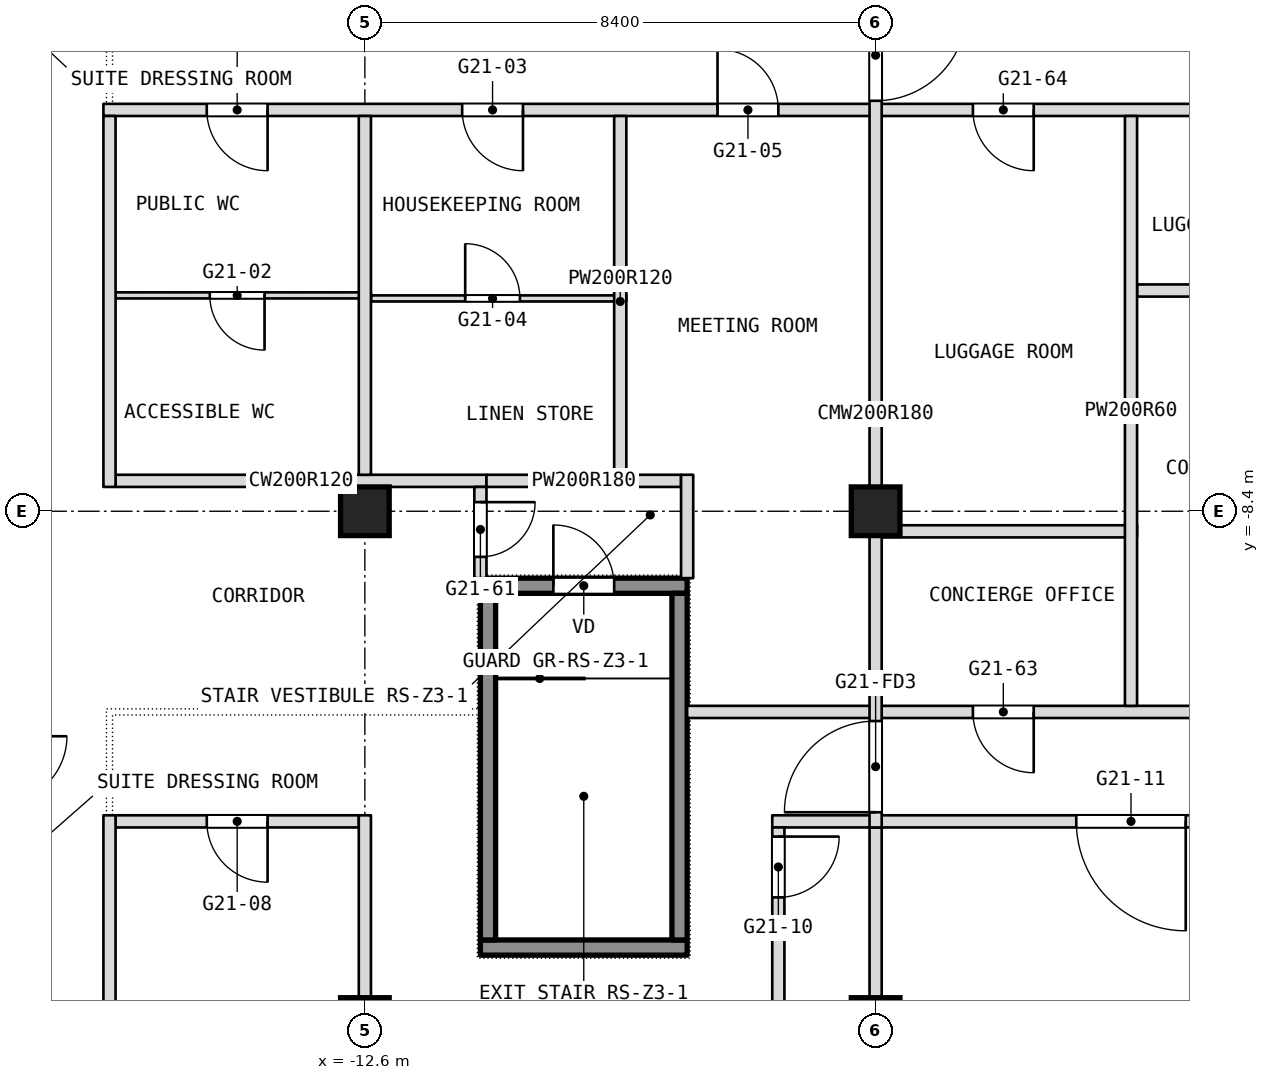
"""IFC4 building model, lengths in metres.
Left out: names, types, materials, properties, quantities, classifications, styles, units other than length and angle.
Written with IfcOpenShell. Run it as: python <this file> out.ifc"""

import sys

from ifc_helpers import new_model, si_unit, direction, frame, frame_2d, origin, origin_2d, place, context, subcontext, project, spatial, rectangle, extrude, element, fill, save


model = new_model("IFC4")
c1 = context("Model", 3, precision=1e-05, world=origin(), true_north=direction((0.0, 1.0)))
c2 = subcontext(c1, "Body", "Model", "MODEL_VIEW")
j1 = project(units=[si_unit("LENGTHUNIT", "METRE"), si_unit("PLANEANGLEUNIT", "RADIAN")], contexts=[c1])
p1 = place(None, origin())
s1 = spatial("IfcSite", under=j1, at=p1, CompositionType="ELEMENT")
p2 = place(p1, origin())
s2 = spatial("IfcBuilding", under=s1, at=p2, CompositionType="ELEMENT")
p3 = place(p2, frame((0.0, 0.0, 248.9)))
s3 = spatial("IfcBuildingStorey", under=s2, at=p3, CompositionType="ELEMENT", Elevation=248.9)
for number, where, z_axis, x_axis in (
    (1, (-12.6, -16.8, 0.0), (0.0, 0.0, 1.0), (1.0, 0.0, 0.0)),
    (2, (-12.6, -8.4, 0.0), (0.0, 0.0, 1.0), (1.0, 0.0, 0.0)),
    (3, (-4.2, -16.8, 0.0), (0.0, 0.0, 1.0), (1.0, 0.0, 0.0)),
    (4, (-4.2, -8.4, 0.0), (0.0, 0.0, 1.0), (1.0, 0.0, 0.0)),
):
    element("IfcColumn", number, at=place(p3, frame(where, z_axis=z_axis, x_axis=x_axis)), inside=s3, PredefinedType="COLUMN", context=c2, shape_type="SweptSolid", body=[
        extrude(rectangle(XDim=0.8, YDim=0.8, at=origin_2d()), origin(), (0.0, 0.0, 1.0), 3.6),
    ])
p4 = place(p3, frame((-16.7, -13.5, 0.0), z_axis=(0.0, 0.0, 1.0), x_axis=(1.0, 0.0, 0.0)))
e5 = element("IfcWall", 5, at=p4, inside=s3, PredefinedType="PARTITIONING", context=c2, shape_type="SweptSolid", body=[
    extrude(rectangle(XDim=4.0, YDim=0.2, at=frame_2d((2.0, 0.0))), origin(), (0.0, 0.0, 1.0), 3.3),
])
p5 = place(p4, frame((1.5, 0.0, 0.0)))
e6 = element("IfcOpeningElement", 6, at=p5, cuts=e5, PredefinedType="OPENING", context=c2, shape_type="SweptSolid", body=[
    extrude(rectangle(XDim=1.0, YDim=2.1, at=frame_2d((0.5, 1.05))), frame((0.0, 0.1, 0.0), z_axis=(0.0, -1.0, 0.0), x_axis=(1.0, 0.0, 0.0)), (0.0, 0.0, 1.0), 0.2),
])
p6 = place(p3, frame((-5.9, -13.5, 0.0), z_axis=(0.0, 0.0, 1.0), x_axis=(1.0, 0.0, 0.0)))
e7 = element("IfcWall", 7, at=p6, inside=s3, PredefinedType="PARTITIONING", context=c2, shape_type="SweptSolid", body=[
    extrude(rectangle(XDim=11.6, YDim=0.2, at=frame_2d((5.8, 0.0))), origin(), (0.0, 0.0, 1.0), 3.3),
])
p7 = place(p6, frame((5.0, 0.0, 0.0)))
e8 = element("IfcOpeningElement", 8, at=p7, cuts=e7, PredefinedType="OPENING", context=c2, shape_type="SweptSolid", body=[
    extrude(rectangle(XDim=1.8, YDim=2.1, at=frame_2d((0.9, 1.05))), frame((0.0, 0.1, 0.0), z_axis=(0.0, -1.0, 0.0), x_axis=(1.0, 0.0, 0.0)), (0.0, 0.0, 1.0), 0.2),
])
p8 = place(p3, frame((-7.3, -11.7, 0.0), z_axis=(0.0, 0.0, 1.0), x_axis=(1.0, 0.0, 0.0)))
e9 = element("IfcWall", 9, at=p8, inside=s3, PredefinedType="PARTITIONING", context=c2, shape_type="SweptSolid", body=[
    extrude(rectangle(XDim=14.6, YDim=0.2, at=frame_2d((7.3, 0.0))), origin(), (0.0, 0.0, 1.0), 3.3),
])
p9 = place(p8, frame((4.7, 0.0, 0.0)))
e10 = element("IfcOpeningElement", 10, at=p9, cuts=e9, PredefinedType="OPENING", context=c2, shape_type="SweptSolid", body=[
    extrude(rectangle(XDim=1.0, YDim=2.1, at=frame_2d((0.5, 1.05))), frame((0.0, 0.1, 0.0), z_axis=(0.0, -1.0, 0.0), x_axis=(1.0, 0.0, 0.0)), (0.0, 0.0, 1.0), 0.2),
])
p10 = place(p8, frame((8.9, 0.0, 0.0)))
e11 = element("IfcOpeningElement", 11, at=p10, cuts=e9, PredefinedType="OPENING", context=c2, shape_type="SweptSolid", body=[
    extrude(rectangle(XDim=1.0, YDim=2.1, at=frame_2d((0.5, 1.05))), frame((0.0, 0.1, 0.0), z_axis=(0.0, -1.0, 0.0), x_axis=(1.0, 0.0, 0.0)), (0.0, 0.0, 1.0), 0.2),
])
p11 = place(p3, frame((-4.1, -8.73, 0.0), z_axis=(0.0, 0.0, 1.0), x_axis=(1.0, 0.0, 0.0)))
e12 = element("IfcWall", 12, at=p11, inside=s3, PredefinedType="PARTITIONING", context=c2, shape_type="SweptSolid", body=[
    extrude(rectangle(XDim=4.2, YDim=0.2, at=frame_2d((2.1, 0.0))), origin(), (0.0, 0.0, 1.0), 3.3),
])
p12 = place(p3, frame((-16.7, -7.9, 0.0), z_axis=(0.0, 0.0, 1.0), x_axis=(1.0, 0.0, 0.0)))
e13 = element("IfcWall", 13, at=p12, inside=s3, PredefinedType="PARTITIONING", context=c2, shape_type="SweptSolid", body=[
    extrude(rectangle(XDim=6.1, YDim=0.2, at=frame_2d((3.05, 0.0))), origin(), (0.0, 0.0, 1.0), 3.3),
])
p13 = place(p3, frame((-10.6, -7.9, 0.0), z_axis=(0.0, 0.0, 1.0), x_axis=(1.0, 0.0, 0.0)))
e14 = element("IfcWall", 14, at=p13, inside=s3, PredefinedType="PARTITIONING", context=c2, shape_type="SweptSolid", body=[
    extrude(rectangle(XDim=3.2, YDim=0.2, at=frame_2d((1.6, 0.0))), origin(), (0.0, 0.0, 1.0), 3.3),
])
p14 = place(p3, frame((-12.5, -4.9, 0.0), z_axis=(0.0, 0.0, 1.0), x_axis=(1.0, 0.0, 0.0)))
e15 = element("IfcWall", 15, at=p14, inside=s3, PredefinedType="PARTITIONING", context=c2, shape_type="SweptSolid", body=[
    extrude(rectangle(XDim=4.2, YDim=0.1, at=frame_2d((2.1, 0.0))), origin(), (0.0, 0.0, 1.0), 3.3),
])
p15 = place(p14, frame((1.55, 0.0, 0.0)))
e16 = element("IfcOpeningElement", 16, at=p15, cuts=e15, PredefinedType="OPENING", context=c2, shape_type="SweptSolid", body=[
    extrude(rectangle(XDim=0.9, YDim=2.1, at=frame_2d((0.45, 1.05))), frame((0.0, 0.05, 0.0), z_axis=(0.0, -1.0, 0.0), x_axis=(1.0, 0.0, 0.0)), (0.0, 0.0, 1.0), 0.1),
])
p16 = place(p3, frame((-16.7, -4.85, 0.0), z_axis=(0.0, 0.0, 1.0), x_axis=(1.0, 0.0, 0.0)))
e17 = element("IfcWall", 17, at=p16, inside=s3, PredefinedType="PARTITIONING", context=c2, shape_type="SweptSolid", body=[
    extrude(rectangle(XDim=4.2, YDim=0.1, at=frame_2d((2.1, 0.0))), origin(), (0.0, 0.0, 1.0), 3.3),
])
p17 = place(p16, frame((1.55, 0.0, 0.0)))
e18 = element("IfcOpeningElement", 18, at=p17, cuts=e17, PredefinedType="OPENING", context=c2, shape_type="SweptSolid", body=[
    extrude(rectangle(XDim=0.9, YDim=2.1, at=frame_2d((0.45, 1.05))), frame((0.0, 0.05, 0.0), z_axis=(0.0, -1.0, 0.0), x_axis=(1.0, 0.0, 0.0)), (0.0, 0.0, 1.0), 0.1),
])
p18 = place(p3, frame((0.1, -4.77, 0.0), z_axis=(0.0, 0.0, 1.0), x_axis=(1.0, 0.0, 0.0)))
e19 = element("IfcWall", 19, at=p18, inside=s3, PredefinedType="PARTITIONING", context=c2, shape_type="SweptSolid", body=[
    extrude(rectangle(XDim=4.0, YDim=0.2, at=frame_2d((2.0, 0.0))), origin(), (0.0, 0.0, 1.0), 3.3),
])
p19 = place(p3, frame((-16.9, -1.8, 0.0), z_axis=(0.0, 0.0, 1.0), x_axis=(1.0, 0.0, 0.0)))
e20 = element("IfcWall", 20, at=p19, inside=s3, PredefinedType="PARTITIONING", context=c2, shape_type="SweptSolid", body=[
    extrude(rectangle(XDim=33.8, YDim=0.2, at=frame_2d((16.9, 0.0))), origin(), (0.0, 0.0, 1.0), 3.3),
])
p20 = place(p19, frame((1.7, 0.0, 0.0)))
e21 = element("IfcOpeningElement", 21, at=p20, cuts=e20, PredefinedType="OPENING", context=c2, shape_type="SweptSolid", body=[
    extrude(rectangle(XDim=1.0, YDim=2.1, at=frame_2d((0.5, 1.05))), frame((0.0, 0.1, 0.0), z_axis=(0.0, -1.0, 0.0), x_axis=(1.0, 0.0, 0.0)), (0.0, 0.0, 1.0), 0.2),
])
p21 = place(p19, frame((5.9, 0.0, 0.0)))
e22 = element("IfcOpeningElement", 22, at=p21, cuts=e20, PredefinedType="OPENING", context=c2, shape_type="SweptSolid", body=[
    extrude(rectangle(XDim=1.0, YDim=2.1, at=frame_2d((0.5, 1.05))), frame((0.0, 0.1, 0.0), z_axis=(0.0, -1.0, 0.0), x_axis=(1.0, 0.0, 0.0)), (0.0, 0.0, 1.0), 0.2),
])
p22 = place(p19, frame((10.1, 0.0, 0.0)))
e23 = element("IfcOpeningElement", 23, at=p22, cuts=e20, PredefinedType="OPENING", context=c2, shape_type="SweptSolid", body=[
    extrude(rectangle(XDim=1.0, YDim=2.1, at=frame_2d((0.5, 1.05))), frame((0.0, 0.1, 0.0), z_axis=(0.0, -1.0, 0.0), x_axis=(1.0, 0.0, 0.0)), (0.0, 0.0, 1.0), 0.2),
])
p23 = place(p19, frame((24.4, 0.0, 0.0)))
e24 = element("IfcOpeningElement", 24, at=p23, cuts=e20, PredefinedType="OPENING", context=c2, shape_type="SweptSolid", body=[
    extrude(rectangle(XDim=1.8, YDim=2.1, at=frame_2d((0.9, 1.05))), frame((0.0, 0.1, 0.0), z_axis=(0.0, -1.0, 0.0), x_axis=(1.0, 0.0, 0.0)), (0.0, 0.0, 1.0), 0.2),
])
p24 = place(p19, frame((31.1, 0.0, 0.0)))
e25 = element("IfcOpeningElement", 25, at=p24, cuts=e20, PredefinedType="OPENING", context=c2, shape_type="SweptSolid", body=[
    extrude(rectangle(XDim=1.0, YDim=2.1, at=frame_2d((0.5, 1.05))), frame((0.0, 0.1, 0.0), z_axis=(0.0, -1.0, 0.0), x_axis=(1.0, 0.0, 0.0)), (0.0, 0.0, 1.0), 0.2),
])
p25 = place(p19, frame((14.3, 0.0, 0.0)))
e26 = element("IfcOpeningElement", 26, at=p25, cuts=e20, PredefinedType="OPENING", context=c2, shape_type="SweptSolid", body=[
    extrude(rectangle(XDim=1.0, YDim=2.1, at=frame_2d((0.5, 1.05))), frame((0.0, 0.1, 0.0), z_axis=(0.0, -1.0, 0.0), x_axis=(1.0, 0.0, 0.0)), (0.0, 0.0, 1.0), 0.2),
])
p26 = place(p19, frame((18.5, 0.0, 0.0)))
e27 = element("IfcOpeningElement", 27, at=p26, cuts=e20, PredefinedType="OPENING", context=c2, shape_type="SweptSolid", body=[
    extrude(rectangle(XDim=1.0, YDim=2.1, at=frame_2d((0.5, 1.05))), frame((0.0, 0.1, 0.0), z_axis=(0.0, -1.0, 0.0), x_axis=(1.0, 0.0, 0.0)), (0.0, 0.0, 1.0), 0.2),
])
p27 = place(p3, frame((0.0, -11.6, 0.0), z_axis=(0.0, 0.0, 1.0), x_axis=(0.0, 1.0, 0.0)))
e28 = element("IfcWall", 28, at=p27, inside=s3, PredefinedType="PARTITIONING", context=c2, shape_type="SweptSolid", body=[
    extrude(rectangle(XDim=9.7, YDim=0.2, at=frame_2d((4.85, 0.0))), origin(), (0.0, 0.0, 1.0), 3.3),
])
p28 = place(p3, frame((-4.2, -22.0, 0.0), z_axis=(0.0, 0.0, 1.0), x_axis=(0.0, 1.0, 0.0)))
e29 = element("IfcWall", 29, at=p28, inside=s3, PredefinedType="PARTITIONING", context=c2, shape_type="SweptSolid", body=[
    extrude(rectangle(XDim=8.4, YDim=0.2, at=frame_2d((4.2, 0.0))), origin(), (0.0, 0.0, 1.0), 2.486),
])
p29 = place(p28, frame((0.25, 0.0, 0.0)))
e30 = element("IfcOpeningElement", 30, at=p29, cuts=e29, PredefinedType="OPENING", context=c2, shape_type="SweptSolid", body=[
    extrude(rectangle(XDim=1.5, YDim=2.1, at=frame_2d((0.75, 1.05))), frame((0.0, 0.1, 0.0), z_axis=(0.0, -1.0, 0.0), x_axis=(1.0, 0.0, 0.0)), (0.0, 0.0, 1.0), 0.2),
])
p30 = place(p3, frame((-4.2, -13.6, 0.0), z_axis=(0.0, 0.0, 1.0), x_axis=(0.0, 1.0, 0.0)))
e31 = element("IfcWall", 31, at=p30, inside=s3, PredefinedType="PARTITIONING", context=c2, shape_type="SweptSolid", body=[
    extrude(rectangle(XDim=13.6, YDim=0.2, at=frame_2d((6.8, 0.0))), origin(), (0.0, 0.0, 1.0), 2.486),
])
p31 = place(p30, frame((11.95, 0.0, 0.0)))
e32 = element("IfcOpeningElement", 32, at=p31, cuts=e31, PredefinedType="OPENING", context=c2, shape_type="SweptSolid", body=[
    extrude(rectangle(XDim=1.5, YDim=2.1, at=frame_2d((0.75, 1.05))), frame((0.0, 0.1, 0.0), z_axis=(0.0, -1.0, 0.0), x_axis=(1.0, 0.0, 0.0)), (0.0, 0.0, 1.0), 0.2),
])
p32 = place(p30, frame((0.25, 0.0, 0.0)))
e33 = element("IfcOpeningElement", 33, at=p32, cuts=e31, PredefinedType="OPENING", context=c2, shape_type="SweptSolid", body=[
    extrude(rectangle(XDim=1.5, YDim=2.1, at=frame_2d((0.75, 1.05))), frame((0.0, 0.1, 0.0), z_axis=(0.0, -1.0, 0.0), x_axis=(1.0, 0.0, 0.0)), (0.0, 0.0, 1.0), 0.2),
])
p33 = place(p3, frame((-5.8, -18.5, 0.0), z_axis=(0.0, 0.0, 1.0), x_axis=(0.0, 1.0, 0.0)))
e34 = element("IfcWall", 34, at=p33, inside=s3, PredefinedType="PARTITIONING", context=c2, shape_type="SweptSolid", body=[
    extrude(rectangle(XDim=4.9, YDim=0.2, at=frame_2d((2.45, 0.0))), origin(), (0.0, 0.0, 1.0), 3.3),
])
p34 = place(p33, frame((3.75, 0.0, 0.0)))
e35 = element("IfcOpeningElement", 35, at=p34, cuts=e34, PredefinedType="OPENING", context=c2, shape_type="SweptSolid", body=[
    extrude(rectangle(XDim=1.0, YDim=2.1, at=frame_2d((0.5, 1.05))), frame((0.0, 0.1, 0.0), z_axis=(0.0, -1.0, 0.0), x_axis=(1.0, 0.0, 0.0)), (0.0, 0.0, 1.0), 0.2),
])
p35 = place(p3, frame((-7.3, -9.5, 0.0), z_axis=(0.0, 0.0, 1.0), x_axis=(0.0, 1.0, 0.0)))
e36 = element("IfcWall", 36, at=p35, inside=s3, PredefinedType="PARTITIONING", context=c2, shape_type="SweptSolid", body=[
    extrude(rectangle(XDim=1.7, YDim=0.2, at=frame_2d((0.85, 0.0))), origin(), (0.0, 0.0, 1.0), 3.3),
])
p36 = place(p3, frame((-8.4, -8.0, 0.0), z_axis=(0.0, 0.0, 1.0), x_axis=(0.0, 1.0, 0.0)))
e37 = element("IfcWall", 37, at=p36, inside=s3, PredefinedType="PARTITIONING", context=c2, shape_type="SweptSolid", body=[
    extrude(rectangle(XDim=6.1, YDim=0.2, at=frame_2d((3.05, 0.0))), origin(), (0.0, 0.0, 1.0), 3.3),
])
p37 = place(p3, frame((-10.7, -9.5, 0.0), z_axis=(0.0, 0.0, 1.0), x_axis=(0.0, 1.0, 0.0)))
e38 = element("IfcWall", 38, at=p37, inside=s3, PredefinedType="PARTITIONING", context=c2, shape_type="SweptSolid", body=[
    extrude(rectangle(XDim=1.5, YDim=0.2, at=frame_2d((0.75, 0.0))), origin(), (0.0, 0.0, 1.0), 3.3),
])
p38 = place(p37, frame((0.35, 0.0, 0.0)))
e39 = element("IfcOpeningElement", 39, at=p38, cuts=e38, PredefinedType="OPENING", context=c2, shape_type="SweptSolid", body=[
    extrude(rectangle(XDim=0.9, YDim=2.1, at=frame_2d((0.45, 1.05))), frame((0.0, 0.1, 0.0), z_axis=(0.0, -1.0, 0.0), x_axis=(1.0, 0.0, 0.0)), (0.0, 0.0, 1.0), 0.2),
])
p39 = place(p3, frame((-12.6, -7.8, 0.0), z_axis=(0.0, 0.0, 1.0), x_axis=(0.0, 1.0, 0.0)))
e40 = element("IfcWall", 40, at=p39, inside=s3, PredefinedType="PARTITIONING", context=c2, shape_type="SweptSolid", body=[
    extrude(rectangle(XDim=5.9, YDim=0.2, at=frame_2d((2.95, 0.0))), origin(), (0.0, 0.0, 1.0), 2.486),
])
p40 = place(p3, frame((-12.6, -18.5, 0.0), z_axis=(0.0, 0.0, 1.0), x_axis=(0.0, 1.0, 0.0)))
e41 = element("IfcWall", 41, at=p40, inside=s3, PredefinedType="PARTITIONING", context=c2, shape_type="SweptSolid", body=[
    extrude(rectangle(XDim=5.1, YDim=0.2, at=frame_2d((2.55, 0.0))), origin(), (0.0, 0.0, 1.0), 2.486),
])
p41 = place(p3, frame((-16.8, -20.2, 0.0), z_axis=(0.0, 0.0, 1.0), x_axis=(0.0, 1.0, 0.0)))
e42 = element("IfcWall", 42, at=p41, inside=s3, PredefinedType="PARTITIONING", context=c2, shape_type="SweptSolid", body=[
    extrude(rectangle(XDim=6.8, YDim=0.2, at=frame_2d((3.4, 0.0))), origin(), (0.0, 0.0, 1.0), 3.3),
])
p42 = place(p3, frame((-16.8, -8.0, 0.0), z_axis=(0.0, 0.0, 1.0), x_axis=(0.0, 1.0, 0.0)))
e43 = element("IfcWall", 43, at=p42, inside=s3, PredefinedType="PARTITIONING", context=c2, shape_type="SweptSolid", body=[
    extrude(rectangle(XDim=6.1, YDim=0.2, at=frame_2d((3.05, 0.0))), origin(), (0.0, 0.0, 1.0), 3.3),
])
p43 = place(p3, frame((-10.7, -15.575, 0.1), z_axis=(0.0, 0.0, 1.0), x_axis=(1.0, 0.0, 0.0)))
e44 = element("IfcWall", 44, at=p43, inside=s3, PredefinedType="SHEAR", context=c2, shape_type="SweptSolid", body=[
    extrude(rectangle(XDim=3.4, YDim=0.25, at=frame_2d((1.7, 0.0))), origin(), (0.0, 0.0, 1.0), 3.2),
])
p44 = place(p3, frame((-10.7, -9.625, 0.1), z_axis=(0.0, 0.0, 1.0), x_axis=(1.0, 0.0, 0.0)))
e45 = element("IfcWall", 45, at=p44, inside=s3, PredefinedType="SHEAR", context=c2, shape_type="SweptSolid", body=[
    extrude(rectangle(XDim=3.4, YDim=0.25, at=frame_2d((1.7, 0.0))), origin(), (0.0, 0.0, 1.0), 3.2),
])
p45 = place(p44, frame((1.2, 0.0, 0.0)))
e46 = element("IfcOpeningElement", 46, at=p45, cuts=e45, PredefinedType="OPENING", context=c2, shape_type="SweptSolid", body=[
    extrude(rectangle(XDim=1.0, YDim=2.1, at=frame_2d((0.5, 1.05))), frame((0.0, 0.125, 0.0), z_axis=(0.0, -1.0, 0.0), x_axis=(1.0, 0.0, 0.0)), (0.0, 0.0, 1.0), 0.25),
])
for number, where, z_axis, x_axis in (
    (47, (-10.575, -15.45, 0.1), (0.0, 0.0, 1.0), (0.0, 1.0, 0.0)),
    (48, (-7.425, -15.45, 0.1), (0.0, 0.0, 1.0), (0.0, 1.0, 0.0)),
):
    element("IfcWall", number, at=place(p3, frame(where, z_axis=z_axis, x_axis=x_axis)), inside=s3, PredefinedType="SHEAR", context=c2, shape_type="SweptSolid", body=[
        extrude(rectangle(XDim=5.7, YDim=0.25, at=frame_2d((2.85, 0.0))), origin(), (0.0, 0.0, 1.0), 3.2),
    ])
p46 = place(p5, origin())
e49 = element("IfcDoor", 49, at=p46, inside=s3, OperationType="SINGLE_SWING_RIGHT", PredefinedType="DOOR", context=c2, shape_type="SweptSolid", body=[
    extrude(rectangle(XDim=1.0, YDim=2.1, at=frame_2d((0.5, 1.05))), frame((0.0, 0.025, 0.0), z_axis=(0.0, -1.0, 0.0), x_axis=(1.0, 0.0, 0.0)), (0.0, 0.0, 1.0), 0.05),
])
fill(e6, e49)
p47 = place(p7, origin())
e50 = element("IfcDoor", 50, at=p47, inside=s3, OperationType="DOUBLE_DOOR_SINGLE_SWING", PredefinedType="DOOR", context=c2, shape_type="SweptSolid", body=[
    extrude(rectangle(XDim=1.8, YDim=2.1, at=frame_2d((0.9, 1.05))), frame((0.0, 0.025, 0.0), z_axis=(0.0, -1.0, 0.0), x_axis=(1.0, 0.0, 0.0)), (0.0, 0.0, 1.0), 0.05),
])
fill(e8, e50)
p48 = place(p9, origin())
e51 = element("IfcDoor", 51, at=p48, inside=s3, OperationType="SINGLE_SWING_LEFT", PredefinedType="DOOR", context=c2, shape_type="SweptSolid", body=[
    extrude(rectangle(XDim=1.0, YDim=2.1, at=frame_2d((0.5, 1.05))), frame((0.0, 0.025, 0.0), z_axis=(0.0, -1.0, 0.0), x_axis=(1.0, 0.0, 0.0)), (0.0, 0.0, 1.0), 0.05),
])
fill(e10, e51)
p49 = place(p15, origin())
e52 = element("IfcDoor", 52, at=p49, inside=s3, OperationType="SINGLE_SWING_RIGHT", PredefinedType="DOOR", context=c2, shape_type="SweptSolid", body=[
    extrude(rectangle(XDim=0.9, YDim=2.1, at=frame_2d((0.45, 1.05))), frame((0.0, 0.025, 0.0), z_axis=(0.0, -1.0, 0.0), x_axis=(1.0, 0.0, 0.0)), (0.0, 0.0, 1.0), 0.05),
])
fill(e16, e52)
p50 = place(p17, origin())
e53 = element("IfcDoor", 53, at=p50, inside=s3, OperationType="SINGLE_SWING_RIGHT", PredefinedType="DOOR", context=c2, shape_type="SweptSolid", body=[
    extrude(rectangle(XDim=0.9, YDim=2.1, at=frame_2d((0.45, 1.05))), frame((0.0, 0.025, 0.0), z_axis=(0.0, -1.0, 0.0), x_axis=(1.0, 0.0, 0.0)), (0.0, 0.0, 1.0), 0.05),
])
fill(e18, e53)
p51 = place(p20, origin())
e54 = element("IfcDoor", 54, at=p51, inside=s3, OperationType="SINGLE_SWING_LEFT", PredefinedType="DOOR", context=c2, shape_type="SweptSolid", body=[
    extrude(rectangle(XDim=1.0, YDim=2.1, at=frame_2d((0.5, 1.05))), frame((0.0, 0.025, 0.0), z_axis=(0.0, -1.0, 0.0), x_axis=(1.0, 0.0, 0.0)), (0.0, 0.0, 1.0), 0.05),
])
fill(e21, e54)
p52 = place(p21, origin())
e55 = element("IfcDoor", 55, at=p52, inside=s3, OperationType="SINGLE_SWING_LEFT", PredefinedType="DOOR", context=c2, shape_type="SweptSolid", body=[
    extrude(rectangle(XDim=1.0, YDim=2.1, at=frame_2d((0.5, 1.05))), frame((0.0, 0.025, 0.0), z_axis=(0.0, -1.0, 0.0), x_axis=(1.0, 0.0, 0.0)), (0.0, 0.0, 1.0), 0.05),
])
fill(e22, e55)
p53 = place(p22, origin())
e56 = element("IfcDoor", 56, at=p53, inside=s3, OperationType="SINGLE_SWING_RIGHT", PredefinedType="DOOR", context=c2, shape_type="SweptSolid", body=[
    extrude(rectangle(XDim=1.0, YDim=2.1, at=frame_2d((0.5, 1.05))), frame((0.0, 0.025, 0.0), z_axis=(0.0, -1.0, 0.0), x_axis=(1.0, 0.0, 0.0)), (0.0, 0.0, 1.0), 0.05),
])
fill(e23, e56)
p54 = place(p25, origin())
e57 = element("IfcDoor", 57, at=p54, inside=s3, OperationType="SINGLE_SWING_LEFT", PredefinedType="DOOR", context=c2, shape_type="SweptSolid", body=[
    extrude(rectangle(XDim=1.0, YDim=2.1, at=frame_2d((0.5, 1.05))), frame((0.0, 0.025, 0.0), z_axis=(0.0, -1.0, 0.0), x_axis=(1.0, 0.0, 0.0)), (0.0, 0.0, 1.0), 0.05),
])
fill(e26, e57)
p55 = place(p34, origin())
e58 = element("IfcDoor", 58, at=p55, inside=s3, OperationType="SINGLE_SWING_RIGHT", PredefinedType="DOOR", context=c2, shape_type="SweptSolid", body=[
    extrude(rectangle(XDim=1.0, YDim=2.1, at=frame_2d((0.5, 1.05))), frame((0.0, 0.025, 0.0), z_axis=(0.0, -1.0, 0.0), x_axis=(1.0, 0.0, 0.0)), (0.0, 0.0, 1.0), 0.05),
])
fill(e35, e58)
p56 = place(p38, origin())
e59 = element("IfcDoor", 59, at=p56, inside=s3, OperationType="SINGLE_SWING_LEFT", PredefinedType="DOOR", context=c2, shape_type="SweptSolid", body=[
    extrude(rectangle(XDim=0.9, YDim=2.1, at=frame_2d((0.45, 1.05))), frame((0.0, 0.025, 0.0), z_axis=(0.0, -1.0, 0.0), x_axis=(1.0, 0.0, 0.0)), (0.0, 0.0, 1.0), 0.05),
])
fill(e39, e59)
p57 = place(p45, origin())
e60 = element("IfcDoor", 60, at=p57, inside=s3, OperationType="SINGLE_SWING_LEFT", PredefinedType="DOOR", context=c2, shape_type="SweptSolid", body=[
    extrude(rectangle(XDim=1.0, YDim=2.1, at=frame_2d((0.5, 1.05))), frame((0.0, 0.025, 0.0), z_axis=(0.0, -1.0, 0.0), x_axis=(1.0, 0.0, 0.0)), (0.0, 0.0, 1.0), 0.05),
])
fill(e46, e60)
p58 = place(p31, origin())
e61 = element("IfcDoor", 61, at=p58, inside=s3, OperationType="DOUBLE_DOOR_DOUBLE_SWING", PredefinedType="DOOR", context=c2, shape_type="SweptSolid", body=[
    extrude(rectangle(XDim=1.5, YDim=2.1, at=frame_2d((0.75, 1.05))), frame((0.0, 0.025, 0.0), z_axis=(0.0, -1.0, 0.0), x_axis=(1.0, 0.0, 0.0)), (0.0, 0.0, 1.0), 0.05),
])
fill(e32, e61)
p59 = place(p32, origin())
e62 = element("IfcDoor", 62, at=p59, inside=s3, OperationType="DOUBLE_DOOR_DOUBLE_SWING", PredefinedType="DOOR", context=c2, shape_type="SweptSolid", body=[
    extrude(rectangle(XDim=1.5, YDim=2.1, at=frame_2d((0.75, 1.05))), frame((0.0, 0.025, 0.0), z_axis=(0.0, -1.0, 0.0), x_axis=(1.0, 0.0, 0.0)), (0.0, 0.0, 1.0), 0.05),
])
fill(e33, e62)
save(model, sys.argv[1])
